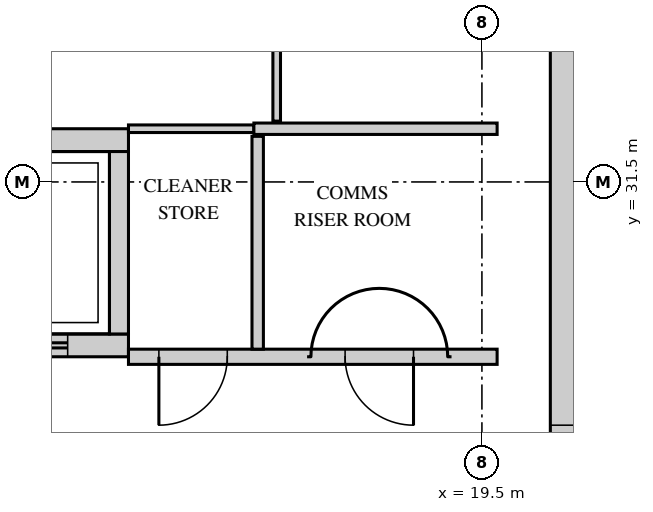
"""IFC4 building model, lengths in metres.
Left out: names, types, materials, properties, quantities, classifications, styles, units other than length and angle.
Written with IfcOpenShell. Run it as: python <this file> out.ifc"""

import sys

from ifc_helpers import new_model, si_unit, direction, frame, frame_2d, origin, place, context, subcontext, project, spatial, rectangle, extrude, source, transform, mapped, element, fill, save


model = new_model("IFC4")
c1 = context("Model", 3, precision=1e-05, world=origin(), true_north=direction((0.0, 1.0)))
c2 = subcontext(c1, "Body", "Model", "MODEL_VIEW")
j1 = project(units=[si_unit("LENGTHUNIT", "METRE"), si_unit("PLANEANGLEUNIT", "RADIAN")], contexts=[c1])
p1 = place(None, origin())
s1 = spatial("IfcSite", under=j1, at=p1, CompositionType="ELEMENT")
p2 = place(p1, origin())
s2 = spatial("IfcBuilding", under=s1, at=p2, CompositionType="ELEMENT")
p3 = place(p2, frame((0.0, 0.0, 302.2)))
s3 = spatial("IfcBuildingStorey", under=s2, at=p3, CompositionType="ELEMENT", Elevation=302.2)
m1 = source(origin(), c2, "Body", "SweptSolid", [
    extrude(rectangle(XDim=22.8, YDim=0.6, at=frame_2d((11.4, 0.0))), origin(), (0.0, 0.0, 1.0), 3.75),
])
p4 = place(p3, frame((20.7, 15.6, 0.0), z_axis=(0.0, 0.0, 1.0), x_axis=(0.0, 1.0, 0.0)))
e1 = element("IfcWall", 1, at=p4, inside=s3, PredefinedType="SHEAR", context=c2, shape_type="MappedRepresentation", body=[
    mapped(m1, transform((0.0, 0.0, 0.0))),
])
m2 = source(origin(), c2, "Body", "SweptSolid", [
    extrude(rectangle(XDim=1.8, YDim=2.1, at=frame_2d((0.9, 1.05))), frame((0.0, 0.31, 0.0), z_axis=(0.0, -1.0, 0.0), x_axis=(1.0, 0.0, 0.0)), (0.0, 0.0, 1.0), 0.62),
])
p5 = place(p4, frame((10.9, 0.0, 0.0)))
e2 = element("IfcOpeningElement", 2, at=p5, cuts=e1, PredefinedType="OPENING", context=c2, shape_type="MappedRepresentation", body=[
    mapped(m2, transform((0.0, 0.0, 0.0))),
])
m3 = source(origin(), c2, "Body", "SweptSolid", [
    extrude(rectangle(XDim=0.9, YDim=2.1, at=frame_2d((0.45, 1.05))), frame((0.0, 0.31, 0.0), z_axis=(0.0, -1.0, 0.0), x_axis=(1.0, 0.0, 0.0)), (0.0, 0.0, 1.0), 0.62),
])
p6 = place(p4, frame((0.55, 0.0, 0.0)))
e3 = element("IfcOpeningElement", 3, at=p6, cuts=e1, PredefinedType="OPENING", context=c2, shape_type="MappedRepresentation", body=[
    mapped(m3, transform((0.0, 0.0, 0.0))),
])
p7 = place(p4, frame((4.1, 0.0, 0.0)))
e4 = element("IfcOpeningElement", 4, at=p7, cuts=e1, PredefinedType="OPENING", context=c2, shape_type="MappedRepresentation", body=[
    mapped(m3, transform((0.0, 0.0, 0.0))),
])
m4 = source(origin(), c2, "Body", "SweptSolid", [
    extrude(rectangle(XDim=7.65, YDim=0.3, at=frame_2d((3.825, 0.0))), origin(), (0.0, 0.0, 1.0), 3.75),
])
p8 = place(p3, frame((7.2, 32.05, 0.0), z_axis=(0.0, 0.0, 1.0), x_axis=(1.0, 0.0, 0.0)))
e5 = element("IfcWall", 5, at=p8, inside=s3, PredefinedType="STANDARD", context=c2, shape_type="MappedRepresentation", body=[
    mapped(m4, transform((0.0, 0.0, 0.0))),
])
p9 = place(p3, frame((7.2, 29.35, 0.0), z_axis=(0.0, 0.0, 1.0), x_axis=(1.0, 0.0, 0.0)))
e6 = element("IfcWall", 6, at=p9, inside=s3, PredefinedType="STANDARD", context=c2, shape_type="MappedRepresentation", body=[
    mapped(m4, transform((0.0, 0.0, 0.0))),
])
m5 = source(origin(), c2, "Body", "SweptSolid", [
    extrude(rectangle(XDim=1.2, YDim=2.1, at=frame_2d((0.6, 1.05))), frame((0.0, 0.16, 0.0), z_axis=(0.0, -1.0, 0.0), x_axis=(1.0, 0.0, 0.0)), (0.0, 0.0, 1.0), 0.32),
])
p10 = place(p9, frame((0.55, 0.0, 0.0)))
e7 = element("IfcOpeningElement", 7, at=p10, cuts=e6, PredefinedType="OPENING", context=c2, shape_type="MappedRepresentation", body=[
    mapped(m5, transform((0.0, 0.0, 0.0))),
])
p11 = place(p9, frame((3.1, 0.0, 0.0)))
e8 = element("IfcOpeningElement", 8, at=p11, cuts=e6, PredefinedType="OPENING", context=c2, shape_type="MappedRepresentation", body=[
    mapped(m5, transform((0.0, 0.0, 0.0))),
])
p12 = place(p9, frame((5.65, 0.0, 0.0)))
e9 = element("IfcOpeningElement", 9, at=p12, cuts=e6, PredefinedType="OPENING", context=c2, shape_type="MappedRepresentation", body=[
    mapped(m5, transform((0.0, 0.0, 0.0))),
])
m6 = source(origin(), c2, "Body", "SweptSolid", [
    extrude(rectangle(XDim=2.4, YDim=0.25, at=frame_2d((1.2, 0.0))), origin(), (0.0, 0.0, 1.0), 3.75),
])
p13 = place(p3, frame((14.725, 29.5, 0.0), z_axis=(0.0, 0.0, 1.0), x_axis=(0.0, 1.0, 0.0)))
e10 = element("IfcWall", 10, at=p13, inside=s3, PredefinedType="STANDARD", context=c2, shape_type="MappedRepresentation", body=[
    mapped(m6, transform((0.0, 0.0, 0.0))),
])
m7 = source(origin(), c2, "Body", "SweptSolid", [
    extrude(rectangle(XDim=4.85, YDim=0.2, at=frame_2d((2.425, 0.0))), origin(), (0.0, 0.0, 1.0), 3.8),
])
p14 = place(p3, frame((14.85, 29.2, 0.0), z_axis=(0.0, 0.0, 1.0), x_axis=(1.0, 0.0, 0.0)))
e11 = element("IfcWall", 11, at=p14, inside=s3, PredefinedType="PARTITIONING", context=c2, shape_type="MappedRepresentation", body=[
    mapped(m7, transform((0.0, 0.0, 0.0))),
])
m8 = source(origin(), c2, "Body", "SweptSolid", [
    extrude(rectangle(XDim=0.9, YDim=2.1, at=frame_2d((0.45, 1.05))), frame((0.0, 0.11, 0.0), z_axis=(0.0, -1.0, 0.0), x_axis=(1.0, 0.0, 0.0)), (0.0, 0.0, 1.0), 0.22),
])
p15 = place(p14, frame((0.4, 0.0, 0.0)))
e12 = element("IfcOpeningElement", 12, at=p15, cuts=e11, PredefinedType="OPENING", context=c2, shape_type="MappedRepresentation", body=[
    mapped(m8, transform((0.0, 0.0, 0.0))),
])
p16 = place(p14, frame((2.85, 0.0, 0.0)))
e13 = element("IfcOpeningElement", 13, at=p16, cuts=e11, PredefinedType="OPENING", context=c2, shape_type="MappedRepresentation", body=[
    mapped(m8, transform((0.0, 0.0, 0.0))),
])
m9 = source(origin(), c2, "Body", "SweptSolid", [
    extrude(rectangle(XDim=2.8, YDim=0.15, at=frame_2d((1.4, 0.0))), origin(), (0.0, 0.0, 1.0), 3.8),
])
p17 = place(p3, frame((16.55, 29.3, 0.0), z_axis=(0.0, 0.0, 1.0), x_axis=(0.0, 1.0, 0.0)))
e14 = element("IfcWall", 14, at=p17, inside=s3, PredefinedType="PARTITIONING", context=c2, shape_type="MappedRepresentation", body=[
    mapped(m9, transform((0.0, 0.0, 0.0))),
])
m10 = source(origin(), c2, "Body", "SweptSolid", [
    extrude(rectangle(XDim=1.65, YDim=0.1, at=frame_2d((0.825, 0.0))), origin(), (0.0, 0.0, 1.0), 3.8),
])
p18 = place(p3, frame((14.85, 32.2, 0.0), z_axis=(0.0, 0.0, 1.0), x_axis=(1.0, 0.0, 0.0)))
e15 = element("IfcWall", 15, at=p18, inside=s3, PredefinedType="PARTITIONING", context=c2, shape_type="MappedRepresentation", body=[
    mapped(m10, transform((0.0, 0.0, 0.0))),
])
m11 = source(origin(), c2, "Body", "SweptSolid", [
    extrude(rectangle(XDim=3.2, YDim=0.15, at=frame_2d((1.6, 0.0))), origin(), (0.0, 0.0, 1.0), 3.8),
])
p19 = place(p3, frame((16.5, 32.2, 0.0), z_axis=(0.0, 0.0, 1.0), x_axis=(1.0, 0.0, 0.0)))
e16 = element("IfcWall", 16, at=p19, inside=s3, PredefinedType="PARTITIONING", context=c2, shape_type="MappedRepresentation", body=[
    mapped(m11, transform((0.0, 0.0, 0.0))),
])
m12 = source(origin(), c2, "Body", "SweptSolid", [
    extrude(rectangle(XDim=5.9, YDim=0.1, at=frame_2d((2.95, 0.0))), origin(), (0.0, 0.0, 1.0), 3.8),
])
p20 = place(p3, frame((16.8, 32.3, 0.0), z_axis=(0.0, 0.0, 1.0), x_axis=(0.0, 1.0, 0.0)))
e17 = element("IfcWall", 17, at=p20, inside=s3, PredefinedType="PARTITIONING", context=c2, shape_type="MappedRepresentation", body=[
    mapped(m12, transform((0.0, 0.0, 0.0))),
])
m13 = source(origin(), c2, "Body", "SweptSolid", [
    extrude(rectangle(XDim=0.9, YDim=2.1, at=frame_2d((0.45, 1.05))), frame((0.0, 0.025, 0.0), z_axis=(0.0, -1.0, 0.0), x_axis=(1.0, 0.0, 0.0)), (0.0, 0.0, 1.0), 0.05),
])
p21 = place(p15, origin())
e18 = element("IfcDoor", 18, at=p21, inside=s3, OperationType="SINGLE_SWING_LEFT", PredefinedType="DOOR", context=c2, shape_type="MappedRepresentation", body=[
    mapped(m13, transform((0.0, 0.0, 0.0))),
])
fill(e12, e18)
p22 = place(p16, origin())
e19 = element("IfcDoor", 19, at=p22, inside=s3, OperationType="SINGLE_SWING_RIGHT", PredefinedType="DOOR", context=c2, shape_type="MappedRepresentation", body=[
    mapped(m13, transform((0.0, 0.0, 0.0))),
])
fill(e13, e19)
m14 = source(origin(), c2, "Body", "SweptSolid", [
    extrude(rectangle(XDim=1.8, YDim=2.1, at=frame_2d((0.9, 1.05))), frame((0.0, 0.25, 0.0), z_axis=(0.0, -1.0, 0.0), x_axis=(1.0, 0.0, 0.0)), (0.0, 0.0, 1.0), 0.5),
])
p23 = place(p5, origin())
e20 = element("IfcDoor", 20, at=p23, inside=s3, OperationType="DOUBLE_DOOR_SINGLE_SWING", PredefinedType="DOOR", context=c2, shape_type="MappedRepresentation", body=[
    mapped(m14, transform((0.0, 0.0, 0.0))),
])
fill(e2, e20)
m15 = source(origin(), c2, "Body", "SweptSolid", [
    extrude(rectangle(XDim=1.2, YDim=2.1, at=frame_2d((0.6, 1.05))), frame((0.0, 0.025, 0.0), z_axis=(0.0, -1.0, 0.0), x_axis=(1.0, 0.0, 0.0)), (0.0, 0.0, 1.0), 0.05),
])
p24 = place(p12, origin())
e21 = element("IfcDoor", 21, at=p24, inside=s3, OperationType="DOUBLE_DOOR_SLIDING", PredefinedType="DOOR", context=c2, shape_type="MappedRepresentation", body=[
    mapped(m15, transform((0.0, 0.0, 0.0))),
])
fill(e9, e21)
save(model, sys.argv[1])
